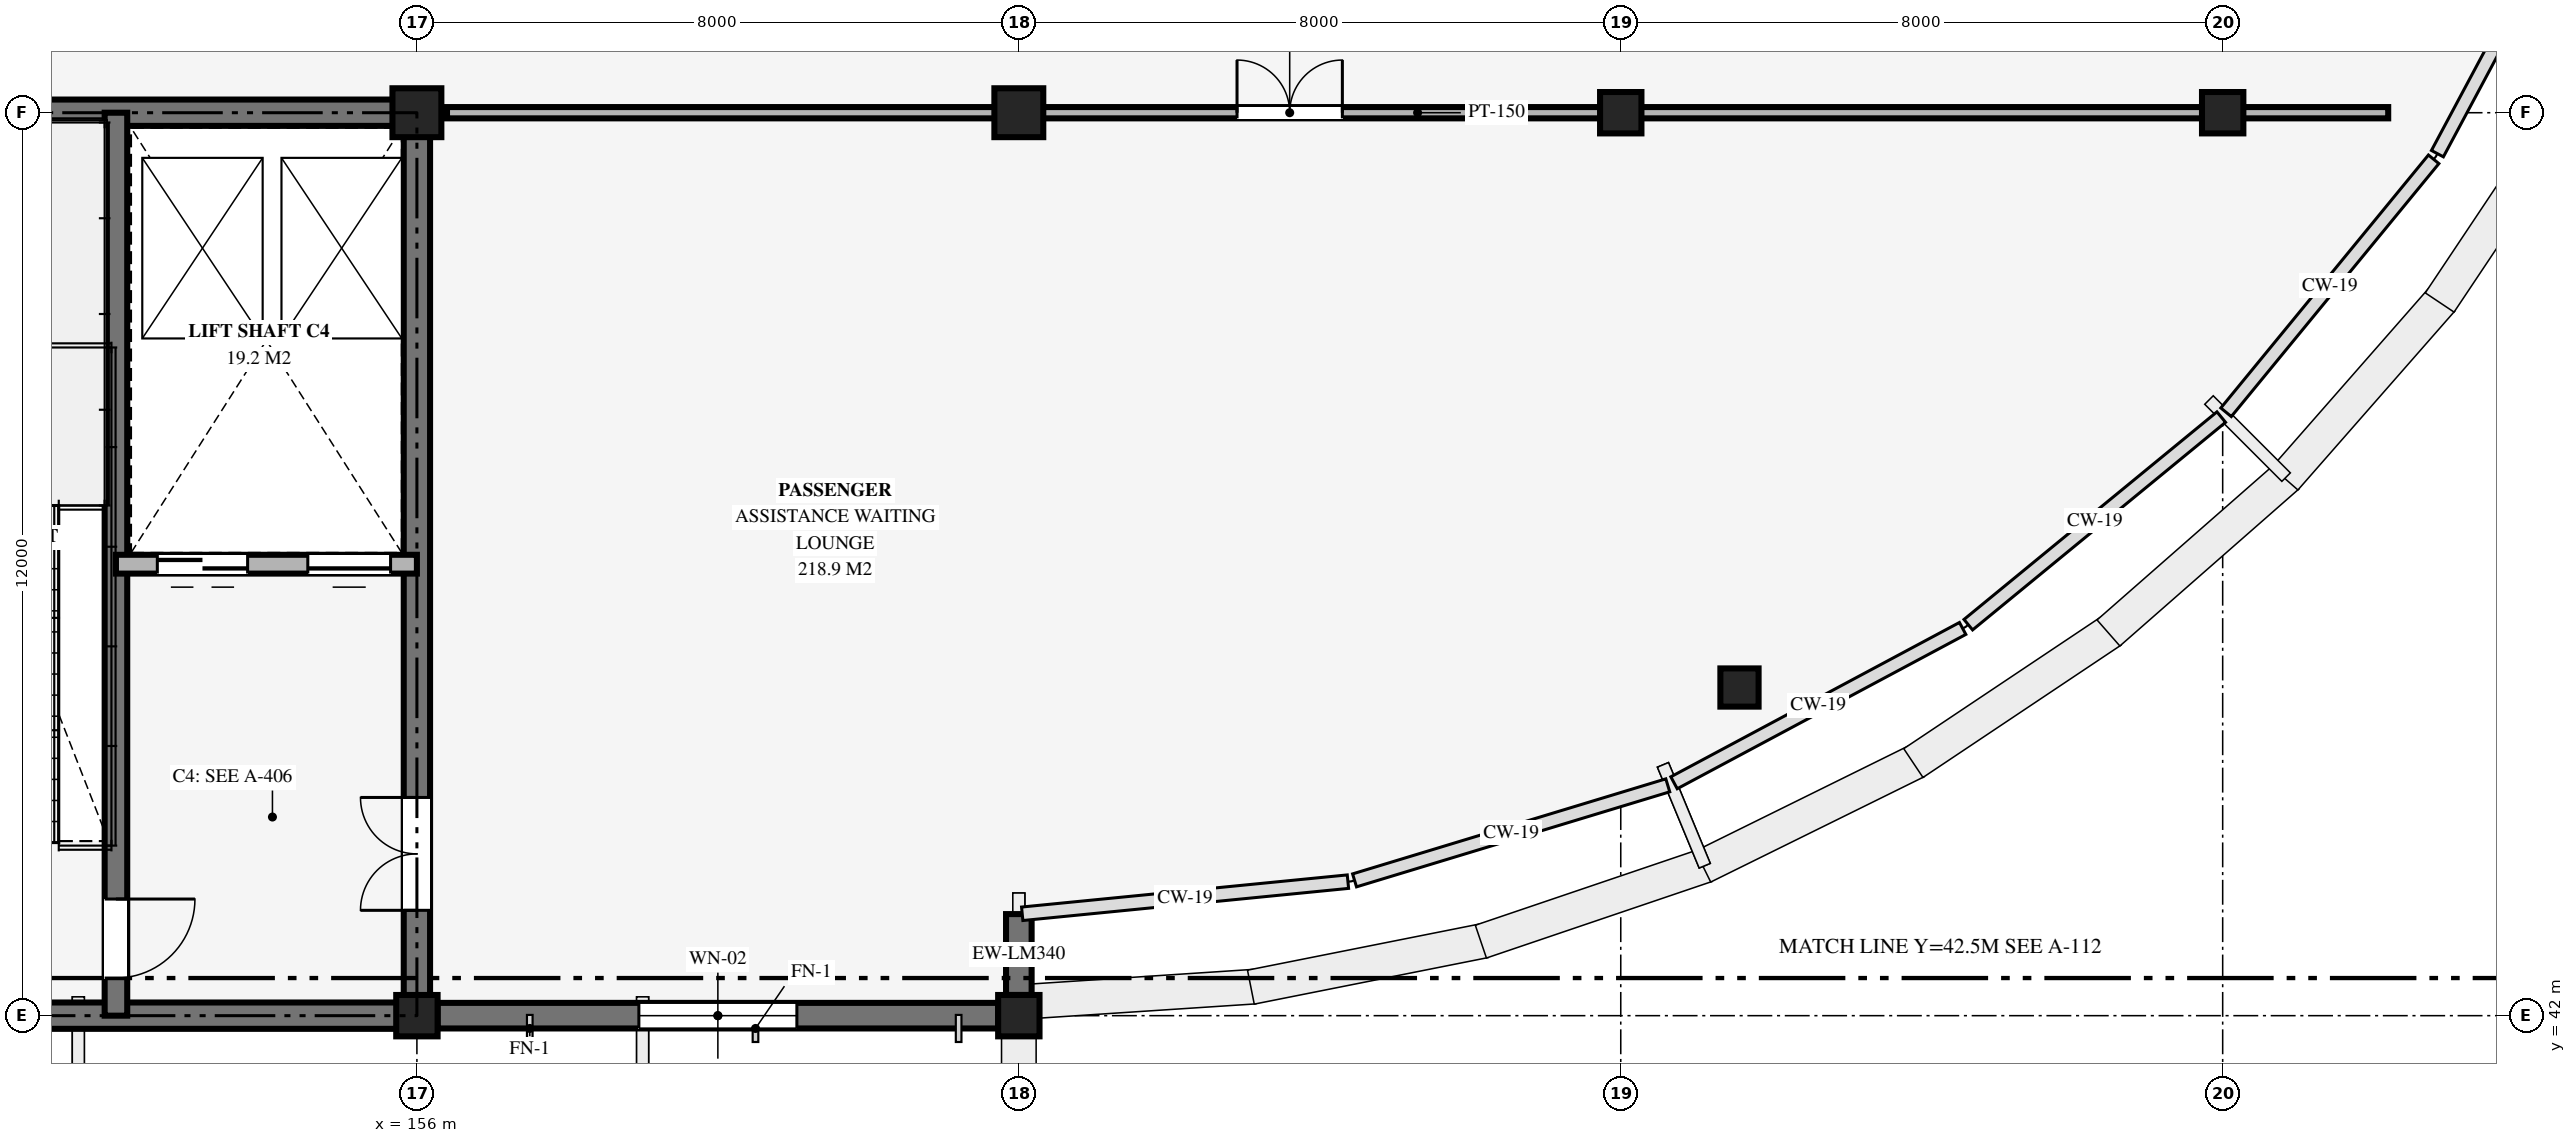
"""IFC4 building model, lengths in metres.
Left out: names, types, materials, properties, quantities, classifications, styles, units other than length and angle.
Written with IfcOpenShell. Run it as: python <this file> out.ifc"""

import sys

from ifc_helpers import new_model, si_unit, direction, frame, frame_2d, origin, origin_2d, place, context, subcontext, project, spatial, rectangle, hollow_circle, extrude, element, fill, save


model = new_model("IFC4")
c1 = context("Model", 3, precision=1e-05, world=origin(), true_north=direction((0.0, 1.0)))
c2 = subcontext(c1, "Body", "Model", "MODEL_VIEW")
j1 = project(units=[si_unit("LENGTHUNIT", "METRE"), si_unit("PLANEANGLEUNIT", "RADIAN")], contexts=[c1])
p1 = place(None, origin())
s1 = spatial("IfcSite", under=j1, at=p1, CompositionType="ELEMENT")
p2 = place(p1, origin())
s2 = spatial("IfcBuilding", under=s1, at=p2, CompositionType="ELEMENT")
p3 = place(p2, frame((0.0, 0.0, 5.4)))
s3 = spatial("IfcBuildingStorey", under=s2, at=p3, CompositionType="ELEMENT", Elevation=5.4)
p4 = place(p3, frame((156.0, 42.0, 0.0), z_axis=(0.0, 0.0, 1.0), x_axis=(1.0, 0.0, 0.0)))
e1 = element("IfcColumn", 1, at=p4, inside=s3, PredefinedType="COLUMN", context=c2, shape_type="SweptSolid", body=[
    extrude(rectangle(XDim=0.55, YDim=0.55, at=origin_2d()), origin(), (0.0, 0.0, 1.0), 4.64),
])
p5 = place(p3, frame((156.0, 54.0, 0.0), z_axis=(0.0, 0.0, 1.0), x_axis=(1.0, 0.0, 0.0)))
e2 = element("IfcColumn", 2, at=p5, inside=s3, PredefinedType="COLUMN", context=c2, shape_type="SweptSolid", body=[
    extrude(rectangle(XDim=0.65, YDim=0.65, at=origin_2d()), origin(), (0.0, 0.0, 1.0), 4.64),
])
p6 = place(p3, frame((164.0, 42.0, 0.0), z_axis=(0.0, 0.0, 1.0), x_axis=(1.0, 0.0, 0.0)))
e3 = element("IfcColumn", 3, at=p6, inside=s3, PredefinedType="COLUMN", context=c2, shape_type="SweptSolid", body=[
    extrude(rectangle(XDim=0.55, YDim=0.55, at=origin_2d()), origin(), (0.0, 0.0, 1.0), 4.64),
])
p7 = place(p3, frame((164.0, 54.0, 0.0), z_axis=(0.0, 0.0, 1.0), x_axis=(1.0, 0.0, 0.0)))
e4 = element("IfcColumn", 4, at=p7, inside=s3, PredefinedType="COLUMN", context=c2, shape_type="SweptSolid", body=[
    extrude(rectangle(XDim=0.65, YDim=0.65, at=origin_2d()), origin(), (0.0, 0.0, 1.0), 4.64),
])
for number, where, z_axis, x_axis in (
    (5, (172.0, 54.0, 0.0), (0.0, 0.0, 1.0), (1.0, 0.0, 0.0)),
    (6, (180.0, 54.0, 0.0), (0.0, 0.0, 1.0), (1.0, 0.0, 0.0)),
):
    element("IfcColumn", number, at=place(p3, frame(where, z_axis=z_axis, x_axis=x_axis)), inside=s3, PredefinedType="COLUMN", context=c2, shape_type="SweptSolid", body=[
        extrude(rectangle(XDim=0.55, YDim=0.55, at=origin_2d()), origin(), (0.0, 0.0, 1.0), 4.64),
    ])
p8 = place(p3, frame((173.578, 46.361, 0.0), z_axis=(0.0, 0.0, 1.0), x_axis=(1.0, 0.0, 0.0)))
e7 = element("IfcColumn", 7, at=p8, inside=s3, PredefinedType="COLUMN", context=c2, shape_type="SweptSolid", body=[
    extrude(hollow_circle(Radius=0.254, WallThickness=0.02, at=origin_2d()), origin(), (0.0, 0.0, 1.0), 4.64),
])
p9 = place(p3, frame((164.0, 42.275, 0.0), z_axis=(0.0, 0.0, 1.0), x_axis=(0.0, 1.0, 0.0)))
e8 = element("IfcWall", 8, at=p9, inside=s3, PredefinedType="SOLIDWALL", context=c2, shape_type="SweptSolid", body=[
    extrude(rectangle(XDim=1.075, YDim=0.34, at=frame_2d((0.538, 0.0))), origin(), (0.0, 0.0, 1.0), 4.52),
])
p10 = place(p3, frame((163.725, 42.0, 0.0), z_axis=(0.0, 0.0, 1.0), x_axis=(-1.0, 0.0, 0.0)))
e9 = element("IfcWall", 9, at=p10, inside=s3, PredefinedType="SOLIDWALL", context=c2, shape_type="SweptSolid", body=[
    extrude(rectangle(XDim=7.45, YDim=0.34, at=frame_2d((3.725, 0.0))), origin(), (0.0, 0.0, 1.0), 4.52),
])
p11 = place(p10, frame((2.675, 0.0, 1.0)))
e10 = element("IfcOpeningElement", 10, at=p11, cuts=e9, PredefinedType="OPENING", context=c2, shape_type="SweptSolid", body=[
    extrude(rectangle(XDim=2.1, YDim=2.2, at=frame_2d((1.05, 1.1))), frame((0.0, 0.18, 0.0), z_axis=(0.0, -1.0, 0.0), x_axis=(1.0, 0.0, 0.0)), (0.0, 0.0, 1.0), 0.36),
])
for number, where, z_axis, x_axis in (
    (11, (148.0, 42.0, 0.0), (0.0, 0.0, 1.0), (1.0, 0.0, 0.0)),
    (12, (148.0, 54.0, 0.0), (0.0, 0.0, 1.0), (1.0, 0.0, 0.0)),
):
    element("IfcWall", number, at=place(p3, frame(where, z_axis=z_axis, x_axis=x_axis)), inside=s3, PredefinedType="SHEAR", context=c2, shape_type="SweptSolid", body=[
        extrude(rectangle(XDim=8.0, YDim=0.35, at=frame_2d((4.0, 0.0))), origin(), (0.0, 0.0, 1.0), 4.78),
    ])
p12 = place(p3, frame((156.0, 42.0, 0.0), z_axis=(0.0, 0.0, 1.0), x_axis=(0.0, 1.0, 0.0)))
e13 = element("IfcWall", 13, at=p12, inside=s3, PredefinedType="SHEAR", context=c2, shape_type="SweptSolid", body=[
    extrude(rectangle(XDim=12.0, YDim=0.35, at=frame_2d((6.0, 0.0))), origin(), (0.0, 0.0, 1.0), 4.78),
])
p13 = place(p12, frame((1.4, 0.0, 0.0)))
e14 = element("IfcOpeningElement", 14, at=p13, cuts=e13, PredefinedType="OPENING", context=c2, shape_type="SweptSolid", body=[
    extrude(rectangle(XDim=1.5, YDim=2.2, at=frame_2d((0.75, 1.1))), frame((0.0, 0.185, 0.0), z_axis=(0.0, -1.0, 0.0), x_axis=(1.0, 0.0, 0.0)), (0.0, 0.0, 1.0), 0.37),
])
p14 = place(p3, frame((152.0, 54.0, 0.0), z_axis=(0.0, 0.0, 1.0), x_axis=(0.0, -1.0, 0.0)))
e15 = element("IfcWall", 15, at=p14, inside=s3, PredefinedType="SHEAR", context=c2, shape_type="SweptSolid", body=[
    extrude(rectangle(XDim=12.0, YDim=0.3, at=frame_2d((6.0, 0.0))), origin(), (0.0, 0.0, 1.0), 4.78),
])
p15 = place(p14, frame((10.45, 0.0, 0.0)))
e16 = element("IfcOpeningElement", 16, at=p15, cuts=e15, PredefinedType="OPENING", context=c2, shape_type="SweptSolid", body=[
    extrude(rectangle(XDim=1.05, YDim=2.15, at=frame_2d((0.525, 1.075))), frame((0.0, 0.16, 0.0), z_axis=(0.0, -1.0, 0.0), x_axis=(1.0, 0.0, 0.0)), (0.0, 0.0, 1.0), 0.32),
])
p16 = place(p3, frame((156.0, 48.0, 0.0), z_axis=(0.0, 0.0, 1.0), x_axis=(-1.0, 0.0, 0.0)))
e17 = element("IfcWall", 17, at=p16, inside=s3, PredefinedType="SOLIDWALL", context=c2, shape_type="SweptSolid", body=[
    extrude(rectangle(XDim=4.0, YDim=0.25, at=frame_2d((2.0, 0.0))), origin(), (0.0, 0.0, 1.0), 3.65),
])
p17 = place(p16, frame((0.35, 0.0, 0.0)))
e18 = element("IfcOpeningElement", 18, at=p17, cuts=e17, PredefinedType="OPENING", context=c2, shape_type="SweptSolid", body=[
    extrude(rectangle(XDim=1.1, YDim=2.2, at=frame_2d((0.55, 1.1))), frame((0.0, 0.135, 0.0), z_axis=(0.0, -1.0, 0.0), x_axis=(1.0, 0.0, 0.0)), (0.0, 0.0, 1.0), 0.27),
])
p18 = place(p16, frame((2.25, 0.0, 0.0)))
e19 = element("IfcOpeningElement", 19, at=p18, cuts=e17, PredefinedType="OPENING", context=c2, shape_type="SweptSolid", body=[
    extrude(rectangle(XDim=1.2, YDim=2.2, at=frame_2d((0.6, 1.1))), frame((0.0, 0.135, 0.0), z_axis=(0.0, -1.0, 0.0), x_axis=(1.0, 0.0, 0.0)), (0.0, 0.0, 1.0), 0.27),
])
p19 = place(p3, frame((156.4, 54.0, 0.0), z_axis=(0.0, 0.0, 1.0), x_axis=(1.0, 0.0, 0.0)))
e20 = element("IfcWall", 20, at=p19, inside=s3, PredefinedType="PARTITIONING", context=c2, shape_type="SweptSolid", body=[
    extrude(rectangle(XDim=25.8, YDim=0.15, at=frame_2d((12.9, 0.0))), origin(), (0.0, 0.0, 1.0), 3.65),
])
p20 = place(p19, frame((10.5, 0.0, 0.0)))
e21 = element("IfcOpeningElement", 21, at=p20, cuts=e20, PredefinedType="OPENING", context=c2, shape_type="SweptSolid", body=[
    extrude(rectangle(XDim=1.4, YDim=2.15, at=frame_2d((0.7, 1.075))), frame((0.0, 0.085, 0.0), z_axis=(0.0, -1.0, 0.0), x_axis=(1.0, 0.0, 0.0)), (0.0, 0.0, 1.0), 0.17),
])
p21 = place(p11, origin())
e22 = element("IfcWindow", 22, at=p21, inside=s3, PartitioningType="SINGLE_PANEL", PredefinedType="WINDOW", context=c2, shape_type="SweptSolid", body=[
    extrude(rectangle(XDim=2.1, YDim=2.2, at=frame_2d((1.05, 1.1))), frame((0.0, 0.03, 0.0), z_axis=(0.0, -1.0, 0.0), x_axis=(1.0, 0.0, 0.0)), (0.0, 0.0, 1.0), 0.06),
])
fill(e10, e22)
p22 = place(p17, origin())
e23 = element("IfcDoor", 23, at=p22, inside=s3, OperationType="SLIDING_TO_LEFT", PredefinedType="USERDEFINED", context=c2, shape_type="SweptSolid", body=[
    extrude(rectangle(XDim=1.1, YDim=2.2, at=frame_2d((0.55, 1.1))), frame((0.0, 0.025, 0.0), z_axis=(0.0, -1.0, 0.0), x_axis=(1.0, 0.0, 0.0)), (0.0, 0.0, 1.0), 0.05),
])
fill(e18, e23)
p23 = place(p18, origin())
e24 = element("IfcDoor", 24, at=p23, inside=s3, OperationType="DOUBLE_DOOR_SLIDING", PredefinedType="USERDEFINED", context=c2, shape_type="SweptSolid", body=[
    extrude(rectangle(XDim=1.2, YDim=2.2, at=frame_2d((0.6, 1.1))), frame((0.0, 0.025, 0.0), z_axis=(0.0, -1.0, 0.0), x_axis=(1.0, 0.0, 0.0)), (0.0, 0.0, 1.0), 0.05),
])
fill(e19, e24)
p24 = place(p15, origin())
e25 = element("IfcDoor", 25, at=p24, inside=s3, OperationType="SINGLE_SWING_LEFT", PredefinedType="DOOR", context=c2, shape_type="SweptSolid", body=[
    extrude(rectangle(XDim=1.05, YDim=2.15, at=frame_2d((0.525, 1.075))), frame((0.0, 0.025, 0.0), z_axis=(0.0, -1.0, 0.0), x_axis=(1.0, 0.0, 0.0)), (0.0, 0.0, 1.0), 0.05),
])
fill(e16, e25)
p25 = place(p13, origin())
e26 = element("IfcDoor", 26, at=p25, inside=s3, OperationType="DOUBLE_DOOR_SINGLE_SWING", PredefinedType="DOOR", context=c2, shape_type="SweptSolid", body=[
    extrude(rectangle(XDim=1.5, YDim=2.2, at=frame_2d((0.75, 1.1))), frame((0.0, 0.025, 0.0), z_axis=(0.0, -1.0, 0.0), x_axis=(1.0, 0.0, 0.0)), (0.0, 0.0, 1.0), 0.05),
])
fill(e14, e26)
p26 = place(p20, origin())
e27 = element("IfcDoor", 27, at=p26, inside=s3, OperationType="DOUBLE_DOOR_SINGLE_SWING", PredefinedType="DOOR", context=c2, shape_type="SweptSolid", body=[
    extrude(rectangle(XDim=1.4, YDim=2.15, at=frame_2d((0.7, 1.075))), frame((0.0, 0.025, 0.0), z_axis=(0.0, -1.0, 0.0), x_axis=(1.0, 0.0, 0.0)), (0.0, 0.0, 1.0), 0.05),
])
fill(e21, e27)
save(model, sys.argv[1])
